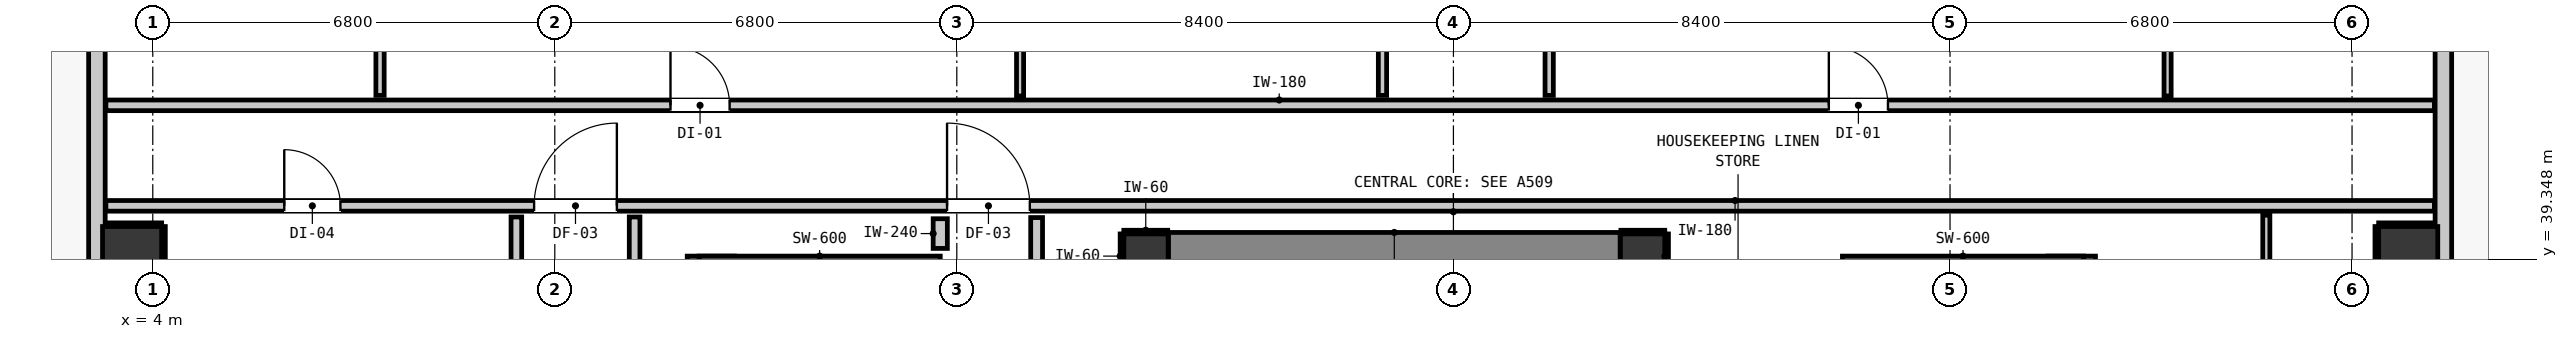
"""IFC4 building model, lengths in metres.
Left out: names, types, materials, properties, quantities, classifications, styles, units other than length and angle.
Written with IfcOpenShell. Run it as: python <this file> out.ifc"""

import sys

from ifc_helpers import new_model, si_unit, direction, frame, frame_2d, origin, origin_2d, place, context, subcontext, project, spatial, rectangle, extrude, element, fill, save


model = new_model("IFC4")
c1 = context("Model", 3, precision=1e-05, world=origin(), true_north=direction((0.0, 1.0)))
c2 = subcontext(c1, "Body", "Model", "MODEL_VIEW")
j1 = project(units=[si_unit("LENGTHUNIT", "METRE"), si_unit("PLANEANGLEUNIT", "RADIAN")], contexts=[c1])
p1 = place(None, origin())
s1 = spatial("IfcSite", under=j1, at=p1, CompositionType="ELEMENT")
p2 = place(p1, origin())
s2 = spatial("IfcBuilding", under=s1, at=p2, CompositionType="ELEMENT")
p3 = place(p2, frame((0.0, 0.0, 176.88)))
s3 = spatial("IfcBuildingStorey", under=s2, at=p3, CompositionType="ELEMENT", Elevation=176.88)
for number, where, z_axis, x_axis in (
    (1, (20.8, 39.4, 0.0), (0.0, 0.0, 1.0), (1.0, 0.0, 0.0)),
    (2, (29.2, 39.4, 0.0), (0.0, 0.0, 1.0), (1.0, 0.0, 0.0)),
):
    element("IfcColumn", number, at=place(p3, frame(where, z_axis=z_axis, x_axis=x_axis)), inside=s3, PredefinedType="COLUMN", context=c2, shape_type="SweptSolid", body=[
        extrude(rectangle(XDim=0.75, YDim=0.75, at=origin_2d()), origin(), (0.0, 0.0, 1.0), 3.32),
    ])
p4 = place(p3, frame((13.44, 31.08, 0.0), z_axis=(0.0, 0.0, 1.0), x_axis=(0.0, 1.0, 0.0)))
e3 = element("IfcWall", 3, at=p4, inside=s3, PredefinedType="SHEAR", context=c2, shape_type="SweptSolid", body=[
    extrude(rectangle(XDim=8.32, YDim=0.8, at=frame_2d((4.16, 0.0))), origin(), (0.0, 0.0, 1.0), 3.32),
])
p5 = place(p3, frame((13.24, 39.1, 0.0), z_axis=(0.0, 0.0, 1.0), x_axis=(1.0, 0.0, 0.0)))
e4 = element("IfcWall", 4, at=p5, inside=s3, PredefinedType="SHEAR", context=c2, shape_type="SweptSolid", body=[
    extrude(rectangle(XDim=4.08, YDim=0.6, at=frame_2d((2.04, 0.0))), origin(), (0.0, 0.0, 1.0), 3.32),
])
p6 = place(p3, frame((36.46, 31.08, 0.0), z_axis=(0.0, 0.0, 1.0), x_axis=(0.0, 1.0, 0.0)))
e5 = element("IfcWall", 5, at=p6, inside=s3, PredefinedType="SHEAR", context=c2, shape_type="SweptSolid", body=[
    extrude(rectangle(XDim=8.32, YDim=0.8, at=frame_2d((4.16, 0.0))), origin(), (0.0, 0.0, 1.0), 3.32),
])
p7 = place(p3, frame((32.58, 39.1, 0.0), z_axis=(0.0, 0.0, 1.0), x_axis=(1.0, 0.0, 0.0)))
e6 = element("IfcWall", 6, at=p7, inside=s3, PredefinedType="SHEAR", context=c2, shape_type="SweptSolid", body=[
    extrude(rectangle(XDim=4.08, YDim=0.6, at=frame_2d((2.04, 0.0))), origin(), (0.0, 0.0, 1.0), 3.32),
])
p8 = place(p3, frame((21.18, 39.4, 0.0), z_axis=(0.0, 0.0, 1.0), x_axis=(1.0, 0.0, 0.0)))
e7 = element("IfcWall", 7, at=p8, inside=s3, PredefinedType="SHEAR", context=c2, shape_type="SweptSolid", body=[
    extrude(rectangle(XDim=7.64, YDim=0.8, at=frame_2d((3.82, 0.0))), origin(), (0.0, 0.0, 1.0), 3.32),
])
for number, where, z_axis, x_axis in (
    (8, (3.65, 39.4, 0.0), (0.0, 0.0, 1.0), (1.0, 0.0, 0.0)),
    (9, (42.15, 39.4, 0.0), (0.0, 0.0, 1.0), (1.0, 0.0, 0.0)),
):
    element("IfcColumn", number, at=place(p3, frame(where, z_axis=z_axis, x_axis=x_axis)), inside=s3, PredefinedType="COLUMN", context=c2, shape_type="SweptSolid", body=[
        extrude(rectangle(XDim=1.0, YDim=1.0, at=origin_2d()), origin(), (0.0, 0.0, 1.0), 3.32),
    ])
p9 = place(p3, frame((3.055, 17.555, 0.0), z_axis=(0.0, 0.0, 1.0), x_axis=(0.0, 1.0, 0.0)))
e10 = element("IfcWall", 10, at=p9, inside=s3, PredefinedType="STANDARD", context=c2, shape_type="SweptSolid", body=[
    extrude(rectangle(XDim=32.29, YDim=0.28, at=frame_2d((16.145, 0.0))), origin(), (0.0, 0.0, 1.0), 3.08),
])
p10 = place(p9, frame((29.684, 0.0, 0.0)))
e11 = element("IfcOpeningElement", 11, at=p10, cuts=e10, PredefinedType="OPENING", context=c2, shape_type="SweptSolid", body=[
    extrude(rectangle(XDim=1.0, YDim=2.15, at=frame_2d((0.5, 1.075))), frame((0.0, 0.15, 0.0), z_axis=(0.0, -1.0, 0.0), x_axis=(1.0, 0.0, 0.0)), (0.0, 0.0, 1.0), 0.3),
])
p11 = place(p9, frame((31.092, 0.0, 0.85)))
e12 = element("IfcOpeningElement", 12, at=p11, cuts=e10, PredefinedType="OPENING", context=c2, shape_type="SweptSolid", body=[
    extrude(rectangle(XDim=0.9, YDim=1.5, at=frame_2d((0.45, 0.75))), frame((0.0, 0.15, 0.0), z_axis=(0.0, -1.0, 0.0), x_axis=(1.0, 0.0, 0.0)), (0.0, 0.0, 1.0), 0.3),
])
p12 = place(p3, frame((42.745, 49.845, 0.0), z_axis=(0.0, 0.0, 1.0), x_axis=(0.0, -1.0, 0.0)))
e13 = element("IfcWall", 13, at=p12, inside=s3, PredefinedType="STANDARD", context=c2, shape_type="SweptSolid", body=[
    extrude(rectangle(XDim=32.29, YDim=0.28, at=frame_2d((16.145, 0.0))), origin(), (0.0, 0.0, 1.0), 3.08),
])
p13 = place(p12, frame((0.904, 0.0, 0.0)))
e14 = element("IfcOpeningElement", 14, at=p13, cuts=e13, PredefinedType="OPENING", context=c2, shape_type="SweptSolid", body=[
    extrude(rectangle(XDim=1.0, YDim=2.15, at=frame_2d((0.5, 1.075))), frame((0.0, 0.15, 0.0), z_axis=(0.0, -1.0, 0.0), x_axis=(1.0, 0.0, 0.0)), (0.0, 0.0, 1.0), 0.3),
])
p14 = place(p12, frame((30.822, 0.0, 0.85)))
e15 = element("IfcOpeningElement", 15, at=p14, cuts=e13, PredefinedType="OPENING", context=c2, shape_type="SweptSolid", body=[
    extrude(rectangle(XDim=1.05, YDim=1.65, at=frame_2d((0.525, 0.825))), frame((0.0, 0.15, 0.0), z_axis=(0.0, -1.0, 0.0), x_axis=(1.0, 0.0, 0.0)), (0.0, 0.0, 1.0), 0.3),
])
p15 = place(p12, frame((13.595, 0.0, 0.85)))
e16 = element("IfcOpeningElement", 16, at=p15, cuts=e13, PredefinedType="OPENING", context=c2, shape_type="SweptSolid", body=[
    extrude(rectangle(XDim=2.4, YDim=1.95, at=frame_2d((1.2, 0.975))), frame((0.0, 0.15, 0.0), z_axis=(0.0, -1.0, 0.0), x_axis=(1.0, 0.0, 0.0)), (0.0, 0.0, 1.0), 0.3),
])
p16 = place(p3, frame((3.207, 40.25, 0.0), z_axis=(0.0, 0.0, 1.0), x_axis=(1.0, 0.0, 0.0)))
e17 = element("IfcWall", 17, at=p16, inside=s3, PredefinedType="PARTITIONING", context=c2, shape_type="SweptSolid", body=[
    extrude(rectangle(XDim=39.386, YDim=0.18, at=frame_2d((19.693, 0.0))), origin(), (0.0, 0.0, 1.0), 3.08),
])
p17 = place(p16, frame((14.228, 0.0, 0.0)))
e18 = element("IfcOpeningElement", 18, at=p17, cuts=e17, PredefinedType="OPENING", context=c2, shape_type="SweptSolid", body=[
    extrude(rectangle(XDim=1.4, YDim=2.15, at=frame_2d((0.7, 1.075))), frame((0.0, 0.1, 0.0), z_axis=(0.0, -1.0, 0.0), x_axis=(1.0, 0.0, 0.0)), (0.0, 0.0, 1.0), 0.2),
])
p18 = place(p16, frame((7.243, 0.0, 0.0)))
e19 = element("IfcOpeningElement", 19, at=p18, cuts=e17, PredefinedType="OPENING", context=c2, shape_type="SweptSolid", body=[
    extrude(rectangle(XDim=1.4, YDim=2.15, at=frame_2d((0.7, 1.075))), frame((0.0, 0.1, 0.0), z_axis=(0.0, -1.0, 0.0), x_axis=(1.0, 0.0, 0.0)), (0.0, 0.0, 1.0), 0.2),
])
p19 = place(p16, frame((3.017, 0.0, 0.0)))
e20 = element("IfcOpeningElement", 20, at=p19, cuts=e17, PredefinedType="OPENING", context=c2, shape_type="SweptSolid", body=[
    extrude(rectangle(XDim=0.95, YDim=2.1, at=frame_2d((0.475, 1.05))), frame((0.0, 0.1, 0.0), z_axis=(0.0, -1.0, 0.0), x_axis=(1.0, 0.0, 0.0)), (0.0, 0.0, 1.0), 0.2),
])
p20 = place(p3, frame((3.207, 41.95, 0.0), z_axis=(0.0, 0.0, 1.0), x_axis=(1.0, 0.0, 0.0)))
e21 = element("IfcWall", 21, at=p20, inside=s3, PredefinedType="PARTITIONING", context=c2, shape_type="SweptSolid", body=[
    extrude(rectangle(XDim=39.386, YDim=0.18, at=frame_2d((19.693, 0.0))), origin(), (0.0, 0.0, 1.0), 3.08),
])
p21 = place(p20, frame((9.55, 0.0, 0.0)))
e22 = element("IfcOpeningElement", 22, at=p21, cuts=e21, PredefinedType="OPENING", context=c2, shape_type="SweptSolid", body=[
    extrude(rectangle(XDim=1.0, YDim=2.15, at=frame_2d((0.5, 1.075))), frame((0.0, 0.1, 0.0), z_axis=(0.0, -1.0, 0.0), x_axis=(1.0, 0.0, 0.0)), (0.0, 0.0, 1.0), 0.2),
])
p22 = place(p20, frame((29.143, 0.0, 0.0)))
e23 = element("IfcOpeningElement", 23, at=p22, cuts=e21, PredefinedType="OPENING", context=c2, shape_type="SweptSolid", body=[
    extrude(rectangle(XDim=1.0, YDim=2.15, at=frame_2d((0.5, 1.075))), frame((0.0, 0.1, 0.0), z_axis=(0.0, -1.0, 0.0), x_axis=(1.0, 0.0, 0.0)), (0.0, 0.0, 1.0), 0.2),
])
p23 = place(p3, frame((17.32, 39.53, 0.0), z_axis=(0.0, 0.0, 1.0), x_axis=(0.0, 1.0, 0.0)))
e24 = element("IfcWall", 24, at=p23, inside=s3, PredefinedType="PARTITIONING", context=c2, shape_type="SweptSolid", body=[
    extrude(rectangle(XDim=0.502, YDim=0.24, at=frame_2d((0.251, 0.0))), origin(), (0.0, 0.0, 1.0), 3.08),
])
p24 = place(p3, frame((18.95, 38.918, 0.0), z_axis=(0.0, 0.0, 1.0), x_axis=(0.0, 1.0, 0.0)))
e25 = element("IfcWall", 25, at=p24, inside=s3, PredefinedType="PARTITIONING", context=c2, shape_type="SweptSolid", body=[
    extrude(rectangle(XDim=1.134, YDim=0.2, at=frame_2d((0.567, 0.0))), origin(), (0.0, 0.0, 1.0), 3.08),
])
p25 = place(p3, frame((10.15, 36.768, 0.0), z_axis=(0.0, 0.0, 1.0), x_axis=(0.0, 1.0, 0.0)))
e26 = element("IfcWall", 26, at=p25, inside=s3, PredefinedType="PARTITIONING", context=c2, shape_type="SweptSolid", body=[
    extrude(rectangle(XDim=3.294, YDim=0.18, at=frame_2d((1.647, 0.0))), origin(), (0.0, 0.0, 1.0), 3.08),
])
p26 = place(p3, frame((12.15, 21.368, 0.0), z_axis=(0.0, 0.0, 1.0), x_axis=(0.0, 1.0, 0.0)))
e27 = element("IfcWall", 27, at=p26, inside=s3, PredefinedType="PARTITIONING", context=c2, shape_type="SweptSolid", body=[
    extrude(rectangle(XDim=18.694, YDim=0.18, at=frame_2d((9.347, 0.0))), origin(), (0.0, 0.0, 1.0), 3.08),
])
p27 = place(p3, frame((7.844, 42.118, 0.0), z_axis=(0.0, 0.0, 1.0), x_axis=(0.0, 1.0, 0.0)))
e28 = element("IfcWall", 28, at=p27, inside=s3, PredefinedType="PARTITIONING", context=c2, shape_type="SweptSolid", body=[
    extrude(rectangle(XDim=4.534, YDim=0.14, at=frame_2d((2.267, 0.0))), origin(), (0.0, 0.0, 1.0), 3.08),
])
p28 = place(p27, frame((1.827, 0.0, 0.0)))
e29 = element("IfcOpeningElement", 29, at=p28, cuts=e28, PredefinedType="OPENING", context=c2, shape_type="SweptSolid", body=[
    extrude(rectangle(XDim=0.86, YDim=2.02, at=frame_2d((0.43, 1.01))), frame((0.0, 0.08, 0.0), z_axis=(0.0, -1.0, 0.0), x_axis=(1.0, 0.0, 0.0)), (0.0, 0.0, 1.0), 0.16),
])
p29 = place(p3, frame((24.8, 42.118, 0.0), z_axis=(0.0, 0.0, 1.0), x_axis=(0.0, 1.0, 0.0)))
e30 = element("IfcWall", 30, at=p29, inside=s3, PredefinedType="PARTITIONING", context=c2, shape_type="SweptSolid", body=[
    extrude(rectangle(XDim=4.534, YDim=0.14, at=frame_2d((2.267, 0.0))), origin(), (0.0, 0.0, 1.0), 3.08),
])
p30 = place(p3, frame((27.62, 42.118, 0.0), z_axis=(0.0, 0.0, 1.0), x_axis=(0.0, 1.0, 0.0)))
e31 = element("IfcWall", 31, at=p30, inside=s3, PredefinedType="PARTITIONING", context=c2, shape_type="SweptSolid", body=[
    extrude(rectangle(XDim=4.534, YDim=0.14, at=frame_2d((2.267, 0.0))), origin(), (0.0, 0.0, 1.0), 3.08),
])
p31 = place(p30, frame((1.827, 0.0, 0.0)))
e32 = element("IfcOpeningElement", 32, at=p31, cuts=e31, PredefinedType="OPENING", context=c2, shape_type="SweptSolid", body=[
    extrude(rectangle(XDim=0.86, YDim=2.02, at=frame_2d((0.43, 1.01))), frame((0.0, 0.08, 0.0), z_axis=(0.0, -1.0, 0.0), x_axis=(1.0, 0.0, 0.0)), (0.0, 0.0, 1.0), 0.16),
])
p32 = place(p3, frame((18.67, 42.108, 0.0), z_axis=(0.0, 0.0, 1.0), x_axis=(0.0, 1.0, 0.0)))
e33 = element("IfcWall", 33, at=p32, inside=s3, PredefinedType="PARTITIONING", context=c2, shape_type="SweptSolid", body=[
    extrude(rectangle(XDim=4.554, YDim=0.12, at=frame_2d((2.277, 0.0))), origin(), (0.0, 0.0, 1.0), 3.08),
])
p33 = place(p32, frame((1.817, 0.0, 0.0)))
e34 = element("IfcOpeningElement", 34, at=p33, cuts=e33, PredefinedType="OPENING", context=c2, shape_type="SweptSolid", body=[
    extrude(rectangle(XDim=0.9, YDim=2.1, at=frame_2d((0.45, 1.05))), frame((0.0, 0.07, 0.0), z_axis=(0.0, -1.0, 0.0), x_axis=(1.0, 0.0, 0.0)), (0.0, 0.0, 1.0), 0.14),
])
p34 = place(p3, frame((38.08, 42.108, 0.0), z_axis=(0.0, 0.0, 1.0), x_axis=(0.0, 1.0, 0.0)))
e35 = element("IfcWall", 35, at=p34, inside=s3, PredefinedType="PARTITIONING", context=c2, shape_type="SweptSolid", body=[
    extrude(rectangle(XDim=4.554, YDim=0.12, at=frame_2d((2.277, 0.0))), origin(), (0.0, 0.0, 1.0), 3.08),
])
p35 = place(p34, frame((1.817, 0.0, 0.0)))
e36 = element("IfcOpeningElement", 36, at=p35, cuts=e35, PredefinedType="OPENING", context=c2, shape_type="SweptSolid", body=[
    extrude(rectangle(XDim=0.9, YDim=2.1, at=frame_2d((0.45, 1.05))), frame((0.0, 0.07, 0.0), z_axis=(0.0, -1.0, 0.0), x_axis=(1.0, 0.0, 0.0)), (0.0, 0.0, 1.0), 0.14),
])
p36 = place(p3, frame((39.75, 21.338, 0.0), z_axis=(0.0, 0.0, 1.0), x_axis=(0.0, 1.0, 0.0)))
e37 = element("IfcWall", 37, at=p36, inside=s3, PredefinedType="PARTITIONING", context=c2, shape_type="SweptSolid", body=[
    extrude(rectangle(XDim=18.754, YDim=0.12, at=frame_2d((9.377, 0.0))), origin(), (0.0, 0.0, 1.0), 3.08),
])
p37 = place(p3, frame((20.425, 39.807, 0.0), z_axis=(0.0, 0.0, 1.0), x_axis=(1.0, 0.0, 0.0)))
e38 = element("IfcWall", 38, at=p37, inside=s3, PredefinedType="PARTITIONING", context=c2, shape_type="SweptSolid", body=[
    extrude(rectangle(XDim=0.742, YDim=0.06, at=frame_2d((0.371, 0.0))), origin(), (0.0, 0.0, 1.0), 1.45),
])
p38 = place(p3, frame((20.393, 39.025, 0.0), z_axis=(0.0, 0.0, 1.0), x_axis=(0.0, 1.0, 0.0)))
e39 = element("IfcWall", 39, at=p38, inside=s3, PredefinedType="PARTITIONING", context=c2, shape_type="SweptSolid", body=[
    extrude(rectangle(XDim=0.75, YDim=0.06, at=frame_2d((0.375, 0.0))), origin(), (0.0, 0.0, 1.0), 1.45),
])
p39 = place(p3, frame((28.833, 39.807, 0.0), z_axis=(0.0, 0.0, 1.0), x_axis=(1.0, 0.0, 0.0)))
e40 = element("IfcWall", 40, at=p39, inside=s3, PredefinedType="PARTITIONING", context=c2, shape_type="SweptSolid", body=[
    extrude(rectangle(XDim=0.742, YDim=0.06, at=frame_2d((0.371, 0.0))), origin(), (0.0, 0.0, 1.0), 1.45),
])
p40 = place(p3, frame((29.607, 39.025, 0.0), z_axis=(0.0, 0.0, 1.0), x_axis=(0.0, 1.0, 0.0)))
e41 = element("IfcWall", 41, at=p40, inside=s3, PredefinedType="PARTITIONING", context=c2, shape_type="SweptSolid", body=[
    extrude(rectangle(XDim=0.75, YDim=0.06, at=frame_2d((0.375, 0.0))), origin(), (0.0, 0.0, 1.0), 1.45),
])
p41 = place(p3, frame((3.21, 39.932, 0.0), z_axis=(0.0, 0.0, 1.0), x_axis=(1.0, 0.0, 0.0)))
e42 = element("IfcWall", 42, at=p41, inside=s3, PredefinedType="PARTITIONING", context=c2, shape_type="SweptSolid", body=[
    extrude(rectangle(XDim=0.94, YDim=0.06, at=frame_2d((0.47, 0.0))), origin(), (0.0, 0.0, 1.0), 1.45),
])
p42 = place(p3, frame((4.182, 38.9, 0.0), z_axis=(0.0, 0.0, 1.0), x_axis=(0.0, 1.0, 0.0)))
e43 = element("IfcWall", 43, at=p42, inside=s3, PredefinedType="PARTITIONING", context=c2, shape_type="SweptSolid", body=[
    extrude(rectangle(XDim=1.0, YDim=0.06, at=frame_2d((0.5, 0.0))), origin(), (0.0, 0.0, 1.0), 1.45),
])
p43 = place(p3, frame((41.65, 39.932, 0.0), z_axis=(0.0, 0.0, 1.0), x_axis=(1.0, 0.0, 0.0)))
e44 = element("IfcWall", 44, at=p43, inside=s3, PredefinedType="PARTITIONING", context=c2, shape_type="SweptSolid", body=[
    extrude(rectangle(XDim=0.94, YDim=0.06, at=frame_2d((0.47, 0.0))), origin(), (0.0, 0.0, 1.0), 1.45),
])
p44 = place(p3, frame((41.618, 38.9, 0.0), z_axis=(0.0, 0.0, 1.0), x_axis=(0.0, 1.0, 0.0)))
e45 = element("IfcWall", 45, at=p44, inside=s3, PredefinedType="PARTITIONING", context=c2, shape_type="SweptSolid", body=[
    extrude(rectangle(XDim=1.0, YDim=0.06, at=frame_2d((0.5, 0.0))), origin(), (0.0, 0.0, 1.0), 1.45),
])
p45 = place(p17, origin())
e46 = element("IfcDoor", 46, at=p45, inside=s3, OperationType="SINGLE_SWING_LEFT", PredefinedType="DOOR", context=c2, shape_type="SweptSolid", body=[
    extrude(rectangle(XDim=1.4, YDim=2.15, at=frame_2d((0.7, 1.075))), frame((0.0, 0.025, 0.0), z_axis=(0.0, -1.0, 0.0), x_axis=(1.0, 0.0, 0.0)), (0.0, 0.0, 1.0), 0.05),
])
fill(e18, e46)
p46 = place(p18, origin())
e47 = element("IfcDoor", 47, at=p46, inside=s3, OperationType="SINGLE_SWING_RIGHT", PredefinedType="DOOR", context=c2, shape_type="SweptSolid", body=[
    extrude(rectangle(XDim=1.4, YDim=2.15, at=frame_2d((0.7, 1.075))), frame((0.0, 0.025, 0.0), z_axis=(0.0, -1.0, 0.0), x_axis=(1.0, 0.0, 0.0)), (0.0, 0.0, 1.0), 0.05),
])
fill(e19, e47)
p47 = place(p19, origin())
e48 = element("IfcDoor", 48, at=p47, inside=s3, OperationType="SINGLE_SWING_LEFT", PredefinedType="DOOR", context=c2, shape_type="SweptSolid", body=[
    extrude(rectangle(XDim=0.95, YDim=2.1, at=frame_2d((0.475, 1.05))), frame((0.0, 0.025, 0.0), z_axis=(0.0, -1.0, 0.0), x_axis=(1.0, 0.0, 0.0)), (0.0, 0.0, 1.0), 0.05),
])
fill(e20, e48)
p48 = place(p21, origin())
e49 = element("IfcDoor", 49, at=p48, inside=s3, OperationType="SINGLE_SWING_LEFT", PredefinedType="DOOR", context=c2, shape_type="SweptSolid", body=[
    extrude(rectangle(XDim=1.0, YDim=2.15, at=frame_2d((0.5, 1.075))), frame((0.0, 0.025, 0.0), z_axis=(0.0, -1.0, 0.0), x_axis=(1.0, 0.0, 0.0)), (0.0, 0.0, 1.0), 0.05),
])
fill(e22, e49)
p49 = place(p22, origin())
e50 = element("IfcDoor", 50, at=p49, inside=s3, OperationType="SINGLE_SWING_LEFT", PredefinedType="DOOR", context=c2, shape_type="SweptSolid", body=[
    extrude(rectangle(XDim=1.0, YDim=2.15, at=frame_2d((0.5, 1.075))), frame((0.0, 0.025, 0.0), z_axis=(0.0, -1.0, 0.0), x_axis=(1.0, 0.0, 0.0)), (0.0, 0.0, 1.0), 0.05),
])
fill(e23, e50)
save(model, sys.argv[1])
